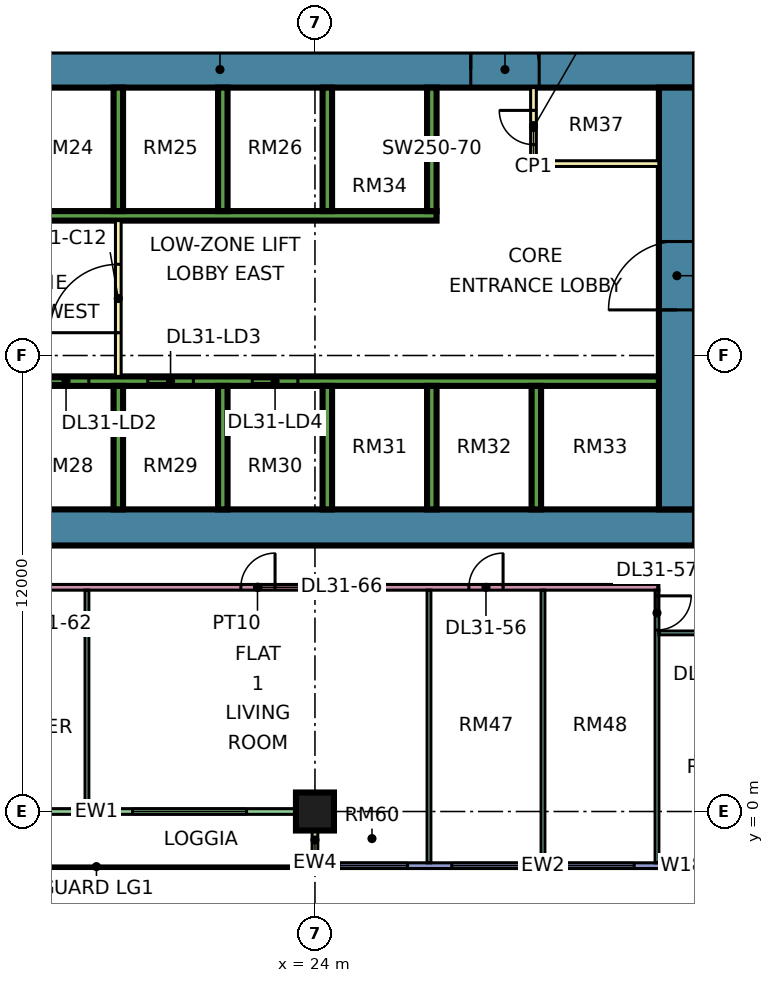
"""IFC4 building model, lengths in metres.
Left out: names, types, materials, properties, quantities, classifications, styles, units other than length and angle.
Written with IfcOpenShell. Run it as: python <this file> out.ifc"""

import sys

from ifc_helpers import new_model, si_unit, direction, frame, frame_2d, origin, origin_2d, place, context, subcontext, project, spatial, rectangle, extrude, element, fill, save


model = new_model("IFC4")
c1 = context("Model", 3, precision=1e-05, world=origin(), true_north=direction((0.0, 1.0)))
c2 = subcontext(c1, "Body", "Model", "MODEL_VIEW")
j1 = project(units=[si_unit("LENGTHUNIT", "METRE"), si_unit("PLANEANGLEUNIT", "RADIAN")], contexts=[c1])
p1 = place(None, origin())
s1 = spatial("IfcSite", under=j1, at=p1, CompositionType="ELEMENT")
p2 = place(p1, origin())
s2 = spatial("IfcBuilding", under=s1, at=p2, CompositionType="ELEMENT")
p3 = place(p2, frame((0.0, 0.0, 133.15)))
s3 = spatial("IfcBuildingStorey", under=s2, at=p3, CompositionType="ELEMENT", Elevation=133.15)
p4 = place(p3, frame((24.0, 0.0, 0.0), z_axis=(0.0, 0.0, 1.0), x_axis=(1.0, 0.0, 0.0)))
e1 = element("IfcColumn", 1, at=p4, inside=s3, PredefinedType="COLUMN", context=c2, shape_type="SweptSolid", body=[
    extrude(rectangle(XDim=1.0, YDim=1.0, at=origin_2d()), origin(), (0.0, 0.0, 1.0), 3.75),
])
p5 = place(p3, frame((9.0, 7.475, 0.0), z_axis=(0.0, 0.0, 1.0), x_axis=(1.0, 0.0, 0.0)))
e2 = element("IfcWall", 2, at=p5, inside=s3, PredefinedType="SHEAR", context=c2, shape_type="SweptSolid", body=[
    extrude(rectangle(XDim=25.0, YDim=0.95, at=frame_2d((12.5, 0.0))), origin(), (0.0, 0.0, 1.0), 3.75),
])
p6 = place(p3, frame((9.0, 19.525, 0.0), z_axis=(0.0, 0.0, 1.0), x_axis=(1.0, 0.0, 0.0)))
e3 = element("IfcWall", 3, at=p6, inside=s3, PredefinedType="SHEAR", context=c2, shape_type="SweptSolid", body=[
    extrude(rectangle(XDim=25.0, YDim=0.95, at=frame_2d((12.5, 0.0))), origin(), (0.0, 0.0, 1.0), 3.75),
])
p7 = place(p6, frame((19.1, 0.0, 0.0)))
e4 = element("IfcOpeningElement", 4, at=p7, cuts=e3, PredefinedType="OPENING", context=c2, shape_type="SweptSolid", body=[
    extrude(rectangle(XDim=1.8, YDim=2.4, at=frame_2d((0.9, 1.2))), frame((0.0, 0.485, 0.0), z_axis=(0.0, -1.0, 0.0), x_axis=(1.0, 0.0, 0.0)), (0.0, 0.0, 1.0), 0.97),
])
p8 = place(p3, frame((33.525, 7.95, 0.0), z_axis=(0.0, 0.0, 1.0), x_axis=(0.0, 1.0, 0.0)))
e5 = element("IfcWall", 5, at=p8, inside=s3, PredefinedType="SHEAR", context=c2, shape_type="SweptSolid", body=[
    extrude(rectangle(XDim=11.1, YDim=0.95, at=frame_2d((5.55, 0.0))), origin(), (0.0, 0.0, 1.0), 3.75),
])
p9 = place(p8, frame((5.25, 0.0, 0.0)))
e6 = element("IfcOpeningElement", 6, at=p9, cuts=e5, PredefinedType="OPENING", context=c2, shape_type="SweptSolid", body=[
    extrude(rectangle(XDim=1.8, YDim=2.4, at=frame_2d((0.9, 1.2))), frame((0.0, 0.485, 0.0), z_axis=(0.0, -1.0, 0.0), x_axis=(1.0, 0.0, 0.0)), (0.0, 0.0, 1.0), 0.97),
])
p10 = place(p3, frame((13.45, 11.325, 0.0), z_axis=(0.0, 0.0, 1.0), x_axis=(1.0, 0.0, 0.0)))
e7 = element("IfcWall", 7, at=p10, inside=s3, PredefinedType="SHEAR", context=c2, shape_type="SweptSolid", body=[
    extrude(rectangle(XDim=19.6, YDim=0.25, at=frame_2d((9.8, 0.0))), origin(), (0.0, 0.0, 1.0), 3.75),
])
p11 = place(p10, frame((0.65, 0.0, 0.0)))
e8 = element("IfcOpeningElement", 8, at=p11, cuts=e7, PredefinedType="OPENING", context=c2, shape_type="SweptSolid", body=[
    extrude(rectangle(XDim=1.2, YDim=2.2, at=frame_2d((0.6, 1.1))), frame((0.0, 0.135, 0.0), z_axis=(0.0, -1.0, 0.0), x_axis=(1.0, 0.0, 0.0)), (0.0, 0.0, 1.0), 0.27),
])
p12 = place(p10, frame((3.4, 0.0, 0.0)))
e9 = element("IfcOpeningElement", 9, at=p12, cuts=e7, PredefinedType="OPENING", context=c2, shape_type="SweptSolid", body=[
    extrude(rectangle(XDim=1.2, YDim=2.2, at=frame_2d((0.6, 1.1))), frame((0.0, 0.135, 0.0), z_axis=(0.0, -1.0, 0.0), x_axis=(1.0, 0.0, 0.0)), (0.0, 0.0, 1.0), 0.27),
])
p13 = place(p10, frame((6.15, 0.0, 0.0)))
e10 = element("IfcOpeningElement", 10, at=p13, cuts=e7, PredefinedType="OPENING", context=c2, shape_type="SweptSolid", body=[
    extrude(rectangle(XDim=1.2, YDim=2.2, at=frame_2d((0.6, 1.1))), frame((0.0, 0.135, 0.0), z_axis=(0.0, -1.0, 0.0), x_axis=(1.0, 0.0, 0.0)), (0.0, 0.0, 1.0), 0.27),
])
p14 = place(p10, frame((8.9, 0.0, 0.0)))
e11 = element("IfcOpeningElement", 11, at=p14, cuts=e7, PredefinedType="OPENING", context=c2, shape_type="SweptSolid", body=[
    extrude(rectangle(XDim=1.2, YDim=2.2, at=frame_2d((0.6, 1.1))), frame((0.0, 0.135, 0.0), z_axis=(0.0, -1.0, 0.0), x_axis=(1.0, 0.0, 0.0)), (0.0, 0.0, 1.0), 0.27),
])
p15 = place(p3, frame((13.45, 15.675, 0.0), z_axis=(0.0, 0.0, 1.0), x_axis=(1.0, 0.0, 0.0)))
e12 = element("IfcWall", 12, at=p15, inside=s3, PredefinedType="SHEAR", context=c2, shape_type="SweptSolid", body=[
    extrude(rectangle(XDim=13.75, YDim=0.25, at=frame_2d((6.875, 0.0))), origin(), (0.0, 0.0, 1.0), 3.75),
])
for number, where, z_axis, x_axis in (
    (13, (18.825, 7.95, 0.0), (0.0, 0.0, 1.0), (0.0, 1.0, 0.0)),
    (14, (21.575, 7.95, 0.0), (0.0, 0.0, 1.0), (0.0, 1.0, 0.0)),
    (15, (24.325, 7.95, 0.0), (0.0, 0.0, 1.0), (0.0, 1.0, 0.0)),
    (16, (27.075, 7.95, 0.0), (0.0, 0.0, 1.0), (0.0, 1.0, 0.0)),
    (17, (29.825, 7.95, 0.0), (0.0, 0.0, 1.0), (0.0, 1.0, 0.0)),
    (18, (18.825, 15.8, 0.0), (0.0, 0.0, 1.0), (0.0, 1.0, 0.0)),
    (19, (21.575, 15.8, 0.0), (0.0, 0.0, 1.0), (0.0, 1.0, 0.0)),
    (20, (24.325, 15.8, 0.0), (0.0, 0.0, 1.0), (0.0, 1.0, 0.0)),
    (21, (27.075, 15.8, 0.0), (0.0, 0.0, 1.0), (0.0, 1.0, 0.0)),
):
    element("IfcWall", number, at=place(p3, frame(where, z_axis=z_axis, x_axis=x_axis)), inside=s3, PredefinedType="SHEAR", context=c2, shape_type="SweptSolid", body=[
        extrude(rectangle(XDim=3.25, YDim=0.25, at=frame_2d((1.625, 0.0))), origin(), (0.0, 0.0, 1.0), 3.75),
    ])
p16 = place(p3, frame((12.575, 0.0, 0.0), z_axis=(0.0, 0.0, 1.0), x_axis=(1.0, 0.0, 0.0)))
e22 = element("IfcWall", 22, at=p16, inside=s3, PredefinedType="SOLIDWALL", context=c2, shape_type="SweptSolid", body=[
    extrude(rectangle(XDim=11.35, YDim=0.15, at=frame_2d((5.675, 0.0))), origin(), (0.0, 0.0, 1.0), 3.35),
])
p17 = place(p16, frame((1.812, 0.0, 0.0)))
e23 = element("IfcOpeningElement", 23, at=p17, cuts=e22, PredefinedType="OPENING", context=c2, shape_type="SweptSolid", body=[
    extrude(rectangle(XDim=1.8, YDim=2.4, at=frame_2d((0.9, 1.2))), frame((0.0, 0.085, 0.0), z_axis=(0.0, -1.0, 0.0), x_axis=(1.0, 0.0, 0.0)), (0.0, 0.0, 1.0), 0.17),
])
p18 = place(p16, frame((6.625, 0.0, 0.45)))
e24 = element("IfcOpeningElement", 24, at=p18, cuts=e22, PredefinedType="OPENING", context=c2, shape_type="SweptSolid", body=[
    extrude(rectangle(XDim=3.0, YDim=2.4, at=frame_2d((1.5, 1.2))), frame((0.0, 0.085, 0.0), z_axis=(0.0, -1.0, 0.0), x_axis=(1.0, 0.0, 0.0)), (0.0, 0.0, 1.0), 0.17),
])
p19 = place(p3, frame((24.0, -1.5, 0.0), z_axis=(0.0, 0.0, 1.0), x_axis=(0.0, 1.0, 0.0)))
e25 = element("IfcWall", 25, at=p19, inside=s3, PredefinedType="SOLIDWALL", context=c2, shape_type="SweptSolid", body=[
    extrude(rectangle(XDim=1.5, YDim=0.15, at=frame_2d((0.75, 0.0))), origin(), (0.0, 0.0, 1.0), 3.35),
])
p20 = place(p3, frame((24.075, -1.425, 0.0), z_axis=(0.0, 0.0, 1.0), x_axis=(1.0, 0.0, 0.0)))
e26 = element("IfcWall", 26, at=p20, inside=s3, PredefinedType="SOLIDWALL", context=c2, shape_type="SweptSolid", body=[
    extrude(rectangle(XDim=11.85, YDim=0.15, at=frame_2d((5.925, 0.0))), origin(), (0.0, 0.0, 1.0), 3.35),
])
p21 = place(p20, frame((0.562, 0.0, 0.45)))
e27 = element("IfcOpeningElement", 27, at=p21, cuts=e26, PredefinedType="OPENING", context=c2, shape_type="SweptSolid", body=[
    extrude(rectangle(XDim=1.8, YDim=2.4, at=frame_2d((0.9, 1.2))), frame((0.0, 0.085, 0.0), z_axis=(0.0, -1.0, 0.0), x_axis=(1.0, 0.0, 0.0)), (0.0, 0.0, 1.0), 0.17),
])
p22 = place(p20, frame((3.525, 0.0, 0.45)))
e28 = element("IfcOpeningElement", 28, at=p22, cuts=e26, PredefinedType="OPENING", context=c2, shape_type="SweptSolid", body=[
    extrude(rectangle(XDim=1.8, YDim=2.4, at=frame_2d((0.9, 1.2))), frame((0.0, 0.085, 0.0), z_axis=(0.0, -1.0, 0.0), x_axis=(1.0, 0.0, 0.0)), (0.0, 0.0, 1.0), 0.17),
])
p23 = place(p20, frame((6.525, 0.0, 0.45)))
e29 = element("IfcOpeningElement", 29, at=p23, cuts=e26, PredefinedType="OPENING", context=c2, shape_type="SweptSolid", body=[
    extrude(rectangle(XDim=1.8, YDim=2.4, at=frame_2d((0.9, 1.2))), frame((0.0, 0.085, 0.0), z_axis=(0.0, -1.0, 0.0), x_axis=(1.0, 0.0, 0.0)), (0.0, 0.0, 1.0), 0.17),
])
p24 = place(p20, frame((9.488, 0.0, 0.45)))
e30 = element("IfcOpeningElement", 30, at=p24, cuts=e26, PredefinedType="OPENING", context=c2, shape_type="SweptSolid", body=[
    extrude(rectangle(XDim=1.8, YDim=2.4, at=frame_2d((0.9, 1.2))), frame((0.0, 0.085, 0.0), z_axis=(0.0, -1.0, 0.0), x_axis=(1.0, 0.0, 0.0)), (0.0, 0.0, 1.0), 0.17),
])
p25 = place(p3, frame((18.825, 11.45, 0.0), z_axis=(0.0, 0.0, 1.0), x_axis=(0.0, 1.0, 0.0)))
e31 = element("IfcWall", 31, at=p25, inside=s3, PredefinedType="PARTITIONING", context=c2, shape_type="SweptSolid", body=[
    extrude(rectangle(XDim=4.1, YDim=0.15, at=frame_2d((2.05, 0.0))), origin(), (0.0, 0.0, 1.0), 3.35),
])
p26 = place(p25, frame((1.15, 0.0, 0.0)))
e32 = element("IfcOpeningElement", 32, at=p26, cuts=e31, PredefinedType="OPENING", context=c2, shape_type="SweptSolid", body=[
    extrude(rectangle(XDim=1.8, YDim=2.4, at=frame_2d((0.9, 1.2))), frame((0.0, 0.085, 0.0), z_axis=(0.0, -1.0, 0.0), x_axis=(1.0, 0.0, 0.0)), (0.0, 0.0, 1.0), 0.17),
])
p27 = place(p3, frame((29.75, 17.05, 0.0), z_axis=(0.0, 0.0, 1.0), x_axis=(0.0, 1.0, 0.0)))
e33 = element("IfcWall", 33, at=p27, inside=s3, PredefinedType="PARTITIONING", context=c2, shape_type="SweptSolid", body=[
    extrude(rectangle(XDim=2.0, YDim=0.15, at=frame_2d((1.0, 0.0))), origin(), (0.0, 0.0, 1.0), 3.35),
])
p28 = place(p27, frame((0.5, 0.0, 0.0)))
e34 = element("IfcOpeningElement", 34, at=p28, cuts=e33, PredefinedType="OPENING", context=c2, shape_type="SweptSolid", body=[
    extrude(rectangle(XDim=0.9, YDim=2.1, at=frame_2d((0.45, 1.05))), frame((0.0, 0.085, 0.0), z_axis=(0.0, -1.0, 0.0), x_axis=(1.0, 0.0, 0.0)), (0.0, 0.0, 1.0), 0.17),
])
p29 = place(p3, frame((29.75, 17.05, 0.0), z_axis=(0.0, 0.0, 1.0), x_axis=(1.0, 0.0, 0.0)))
e35 = element("IfcWall", 35, at=p29, inside=s3, PredefinedType="PARTITIONING", context=c2, shape_type="SweptSolid", body=[
    extrude(rectangle(XDim=3.3, YDim=0.15, at=frame_2d((1.65, 0.0))), origin(), (0.0, 0.0, 1.0), 3.35),
])
p30 = place(p3, frame((11.925, 5.9, 0.0), z_axis=(0.0, 0.0, 1.0), x_axis=(1.0, 0.0, 0.0)))
e36 = element("IfcWall", 36, at=p30, inside=s3, PredefinedType="PARTITIONING", context=c2, shape_type="SweptSolid", body=[
    extrude(rectangle(XDim=21.125, YDim=0.15, at=frame_2d((10.562, 0.0))), origin(), (0.0, 0.0, 1.0), 3.35),
])
p31 = place(p30, frame((16.125, 0.0, 0.0)))
e37 = element("IfcOpeningElement", 37, at=p31, cuts=e36, PredefinedType="OPENING", context=c2, shape_type="SweptSolid", body=[
    extrude(rectangle(XDim=0.9, YDim=2.1, at=frame_2d((0.45, 1.05))), frame((0.0, 0.085, 0.0), z_axis=(0.0, -1.0, 0.0), x_axis=(1.0, 0.0, 0.0)), (0.0, 0.0, 1.0), 0.17),
])
p32 = place(p30, frame((4.125, 0.0, 0.0)))
e38 = element("IfcOpeningElement", 38, at=p32, cuts=e36, PredefinedType="OPENING", context=c2, shape_type="SweptSolid", body=[
    extrude(rectangle(XDim=0.9, YDim=2.1, at=frame_2d((0.45, 1.05))), frame((0.0, 0.085, 0.0), z_axis=(0.0, -1.0, 0.0), x_axis=(1.0, 0.0, 0.0)), (0.0, 0.0, 1.0), 0.17),
])
p33 = place(p30, frame((10.125, 0.0, 0.0)))
e39 = element("IfcOpeningElement", 39, at=p33, cuts=e36, PredefinedType="OPENING", context=c2, shape_type="SweptSolid", body=[
    extrude(rectangle(XDim=0.9, YDim=2.1, at=frame_2d((0.45, 1.05))), frame((0.0, 0.085, 0.0), z_axis=(0.0, -1.0, 0.0), x_axis=(1.0, 0.0, 0.0)), (0.0, 0.0, 1.0), 0.17),
])
p34 = place(p3, frame((18.0, 0.074, 0.0), z_axis=(0.0, 0.0, 1.0), x_axis=(0.0, 1.0, 0.0)))
e40 = element("IfcWall", 40, at=p34, inside=s3, PredefinedType="PARTITIONING", context=c2, shape_type="SweptSolid", body=[
    extrude(rectangle(XDim=5.751, YDim=0.1, at=frame_2d((2.875, 0.0))), origin(), (0.0, 0.0, 1.0), 3.35),
])
p35 = place(p3, frame((27.0, -1.35, 0.0), z_axis=(0.0, 0.0, 1.0), x_axis=(0.0, 1.0, 0.0)))
e41 = element("IfcWall", 41, at=p35, inside=s3, PredefinedType="PARTITIONING", context=c2, shape_type="SweptSolid", body=[
    extrude(rectangle(XDim=7.175, YDim=0.1, at=frame_2d((3.587, 0.0))), origin(), (0.0, 0.0, 1.0), 3.35),
])
p36 = place(p3, frame((30.0, -1.351, 0.0), z_axis=(0.0, 0.0, 1.0), x_axis=(0.0, 1.0, 0.0)))
e42 = element("IfcWall", 42, at=p36, inside=s3, PredefinedType="PARTITIONING", context=c2, shape_type="SweptSolid", body=[
    extrude(rectangle(XDim=7.176, YDim=0.1, at=frame_2d((3.588, 0.0))), origin(), (0.0, 0.0, 1.0), 3.35),
])
p37 = place(p3, frame((33.0, -1.351, 0.0), z_axis=(0.0, 0.0, 1.0), x_axis=(0.0, 1.0, 0.0)))
e43 = element("IfcWall", 43, at=p37, inside=s3, PredefinedType="PARTITIONING", context=c2, shape_type="SweptSolid", body=[
    extrude(rectangle(XDim=7.176, YDim=0.1, at=frame_2d((3.588, 0.0))), origin(), (0.0, 0.0, 1.0), 3.35),
])
p38 = place(p37, frame((6.126, 0.0, 0.0)))
e44 = element("IfcOpeningElement", 44, at=p38, cuts=e43, PredefinedType="OPENING", context=c2, shape_type="SweptSolid", body=[
    extrude(rectangle(XDim=0.9, YDim=2.1, at=frame_2d((0.45, 1.05))), frame((0.0, 0.06, 0.0), z_axis=(0.0, -1.0, 0.0), x_axis=(1.0, 0.0, 0.0)), (0.0, 0.0, 1.0), 0.12),
])
p39 = place(p3, frame((33.05, 4.7, 0.0), z_axis=(0.0, 0.0, 1.0), x_axis=(1.0, 0.0, 0.0)))
e45 = element("IfcWall", 45, at=p39, inside=s3, PredefinedType="PARTITIONING", context=c2, shape_type="SweptSolid", body=[
    extrude(rectangle(XDim=14.85, YDim=0.1, at=frame_2d((7.425, 0.0))), origin(), (0.0, 0.0, 1.0), 3.35),
])
p40 = place(p39, frame((1.0, 0.0, 0.0)))
e46 = element("IfcOpeningElement", 46, at=p40, cuts=e45, PredefinedType="OPENING", context=c2, shape_type="SweptSolid", body=[
    extrude(rectangle(XDim=0.9, YDim=2.1, at=frame_2d((0.45, 1.05))), frame((0.0, 0.06, 0.0), z_axis=(0.0, -1.0, 0.0), x_axis=(1.0, 0.0, 0.0)), (0.0, 0.0, 1.0), 0.12),
])
p41 = place(p39, frame((13.0, 0.0, 0.0)))
e47 = element("IfcOpeningElement", 47, at=p41, cuts=e45, PredefinedType="OPENING", context=c2, shape_type="SweptSolid", body=[
    extrude(rectangle(XDim=0.9, YDim=2.1, at=frame_2d((0.45, 1.05))), frame((0.0, 0.06, 0.0), z_axis=(0.0, -1.0, 0.0), x_axis=(1.0, 0.0, 0.0)), (0.0, 0.0, 1.0), 0.12),
])
p42 = place(p39, frame((7.0, 0.0, 0.0)))
e48 = element("IfcOpeningElement", 48, at=p42, cuts=e45, PredefinedType="OPENING", context=c2, shape_type="SweptSolid", body=[
    extrude(rectangle(XDim=0.9, YDim=2.1, at=frame_2d((0.45, 1.05))), frame((0.0, 0.06, 0.0), z_axis=(0.0, -1.0, 0.0), x_axis=(1.0, 0.0, 0.0)), (0.0, 0.0, 1.0), 0.12),
])
p43 = place(p18, origin())
e49 = element("IfcWindow", 49, at=p43, inside=s3, PartitioningType="SINGLE_PANEL", PredefinedType="WINDOW", context=c2, shape_type="SweptSolid", body=[
    extrude(rectangle(XDim=3.0, YDim=2.4, at=frame_2d((1.5, 1.2))), frame((0.0, 0.03, 0.0), z_axis=(0.0, -1.0, 0.0), x_axis=(1.0, 0.0, 0.0)), (0.0, 0.0, 1.0), 0.06),
])
fill(e24, e49)
p44 = place(p21, origin())
e50 = element("IfcWindow", 50, at=p44, inside=s3, PartitioningType="SINGLE_PANEL", PredefinedType="WINDOW", context=c2, shape_type="SweptSolid", body=[
    extrude(rectangle(XDim=1.8, YDim=2.4, at=frame_2d((0.9, 1.2))), frame((0.0, 0.03, 0.0), z_axis=(0.0, -1.0, 0.0), x_axis=(1.0, 0.0, 0.0)), (0.0, 0.0, 1.0), 0.06),
])
fill(e27, e50)
p45 = place(p22, origin())
e51 = element("IfcWindow", 51, at=p45, inside=s3, PartitioningType="SINGLE_PANEL", PredefinedType="WINDOW", context=c2, shape_type="SweptSolid", body=[
    extrude(rectangle(XDim=1.8, YDim=2.4, at=frame_2d((0.9, 1.2))), frame((0.0, 0.03, 0.0), z_axis=(0.0, -1.0, 0.0), x_axis=(1.0, 0.0, 0.0)), (0.0, 0.0, 1.0), 0.06),
])
fill(e28, e51)
p46 = place(p23, origin())
e52 = element("IfcWindow", 52, at=p46, inside=s3, PartitioningType="SINGLE_PANEL", PredefinedType="WINDOW", context=c2, shape_type="SweptSolid", body=[
    extrude(rectangle(XDim=1.8, YDim=2.4, at=frame_2d((0.9, 1.2))), frame((0.0, 0.03, 0.0), z_axis=(0.0, -1.0, 0.0), x_axis=(1.0, 0.0, 0.0)), (0.0, 0.0, 1.0), 0.06),
])
fill(e29, e52)
p47 = place(p24, origin())
e53 = element("IfcWindow", 53, at=p47, inside=s3, PartitioningType="SINGLE_PANEL", PredefinedType="WINDOW", context=c2, shape_type="SweptSolid", body=[
    extrude(rectangle(XDim=1.8, YDim=2.4, at=frame_2d((0.9, 1.2))), frame((0.0, 0.03, 0.0), z_axis=(0.0, -1.0, 0.0), x_axis=(1.0, 0.0, 0.0)), (0.0, 0.0, 1.0), 0.06),
])
fill(e30, e53)
p48 = place(p12, origin())
e54 = element("IfcDoor", 54, at=p48, inside=s3, OperationType="DOUBLE_DOOR_SLIDING", PredefinedType="DOOR", context=c2, shape_type="SweptSolid", body=[
    extrude(rectangle(XDim=1.2, YDim=2.2, at=frame_2d((0.6, 1.1))), frame((0.0, 0.025, 0.0), z_axis=(0.0, -1.0, 0.0), x_axis=(1.0, 0.0, 0.0)), (0.0, 0.0, 1.0), 0.05),
])
fill(e9, e54)
p49 = place(p13, origin())
e55 = element("IfcDoor", 55, at=p49, inside=s3, OperationType="DOUBLE_DOOR_SLIDING", PredefinedType="DOOR", context=c2, shape_type="SweptSolid", body=[
    extrude(rectangle(XDim=1.2, YDim=2.2, at=frame_2d((0.6, 1.1))), frame((0.0, 0.025, 0.0), z_axis=(0.0, -1.0, 0.0), x_axis=(1.0, 0.0, 0.0)), (0.0, 0.0, 1.0), 0.05),
])
fill(e10, e55)
p50 = place(p14, origin())
e56 = element("IfcDoor", 56, at=p50, inside=s3, OperationType="DOUBLE_DOOR_SLIDING", PredefinedType="DOOR", context=c2, shape_type="SweptSolid", body=[
    extrude(rectangle(XDim=1.2, YDim=2.2, at=frame_2d((0.6, 1.1))), frame((0.0, 0.025, 0.0), z_axis=(0.0, -1.0, 0.0), x_axis=(1.0, 0.0, 0.0)), (0.0, 0.0, 1.0), 0.05),
])
fill(e11, e56)
p51 = place(p9, origin())
e57 = element("IfcDoor", 57, at=p51, inside=s3, OperationType="DOUBLE_DOOR_SINGLE_SWING", PredefinedType="DOOR", context=c2, shape_type="SweptSolid", body=[
    extrude(rectangle(XDim=1.8, YDim=2.4, at=frame_2d((0.9, 1.2))), frame((0.0, 0.025, 0.0), z_axis=(0.0, -1.0, 0.0), x_axis=(1.0, 0.0, 0.0)), (0.0, 0.0, 1.0), 0.05),
])
fill(e6, e57)
p52 = place(p7, origin())
e58 = element("IfcDoor", 58, at=p52, inside=s3, OperationType="DOUBLE_DOOR_SINGLE_SWING", PredefinedType="DOOR", context=c2, shape_type="SweptSolid", body=[
    extrude(rectangle(XDim=1.8, YDim=2.4, at=frame_2d((0.9, 1.2))), frame((0.0, 0.025, 0.0), z_axis=(0.0, -1.0, 0.0), x_axis=(1.0, 0.0, 0.0)), (0.0, 0.0, 1.0), 0.05),
])
fill(e4, e58)
p53 = place(p26, origin())
e59 = element("IfcDoor", 59, at=p53, inside=s3, OperationType="DOUBLE_DOOR_SINGLE_SWING", PredefinedType="DOOR", context=c2, shape_type="SweptSolid", body=[
    extrude(rectangle(XDim=1.8, YDim=2.4, at=frame_2d((0.9, 1.2))), frame((0.0, 0.025, 0.0), z_axis=(0.0, -1.0, 0.0), x_axis=(1.0, 0.0, 0.0)), (0.0, 0.0, 1.0), 0.05),
])
fill(e32, e59)
p54 = place(p28, frame((0.9, 0.0, 0.0), z_axis=(0.0, 0.0, 1.0), x_axis=(-1.0, 0.0, 0.0)))
e60 = element("IfcDoor", 60, at=p54, inside=s3, OperationType="SINGLE_SWING_RIGHT", PredefinedType="DOOR", context=c2, shape_type="SweptSolid", body=[
    extrude(rectangle(XDim=0.9, YDim=2.1, at=frame_2d((0.45, 1.05))), frame((0.0, 0.025, 0.0), z_axis=(0.0, -1.0, 0.0), x_axis=(1.0, 0.0, 0.0)), (0.0, 0.0, 1.0), 0.05),
])
fill(e34, e60)
p55 = place(p31, frame((0.9, 0.0, 0.0), z_axis=(0.0, 0.0, 1.0), x_axis=(-1.0, 0.0, 0.0)))
e61 = element("IfcDoor", 61, at=p55, inside=s3, OperationType="SINGLE_SWING_RIGHT", PredefinedType="DOOR", context=c2, shape_type="SweptSolid", body=[
    extrude(rectangle(XDim=0.9, YDim=2.1, at=frame_2d((0.45, 1.05))), frame((0.0, 0.025, 0.0), z_axis=(0.0, -1.0, 0.0), x_axis=(1.0, 0.0, 0.0)), (0.0, 0.0, 1.0), 0.05),
])
fill(e37, e61)
p56 = place(p38, origin())
e62 = element("IfcDoor", 62, at=p56, inside=s3, OperationType="SINGLE_SWING_RIGHT", PredefinedType="DOOR", context=c2, shape_type="SweptSolid", body=[
    extrude(rectangle(XDim=0.9, YDim=2.1, at=frame_2d((0.45, 1.05))), frame((0.0, 0.025, 0.0), z_axis=(0.0, -1.0, 0.0), x_axis=(1.0, 0.0, 0.0)), (0.0, 0.0, 1.0), 0.05),
])
fill(e44, e62)
p57 = place(p33, frame((0.9, 0.0, 0.0), z_axis=(0.0, 0.0, 1.0), x_axis=(-1.0, 0.0, 0.0)))
e63 = element("IfcDoor", 63, at=p57, inside=s3, OperationType="SINGLE_SWING_RIGHT", PredefinedType="DOOR", context=c2, shape_type="SweptSolid", body=[
    extrude(rectangle(XDim=0.9, YDim=2.1, at=frame_2d((0.45, 1.05))), frame((0.0, 0.025, 0.0), z_axis=(0.0, -1.0, 0.0), x_axis=(1.0, 0.0, 0.0)), (0.0, 0.0, 1.0), 0.05),
])
fill(e39, e63)
save(model, sys.argv[1])
